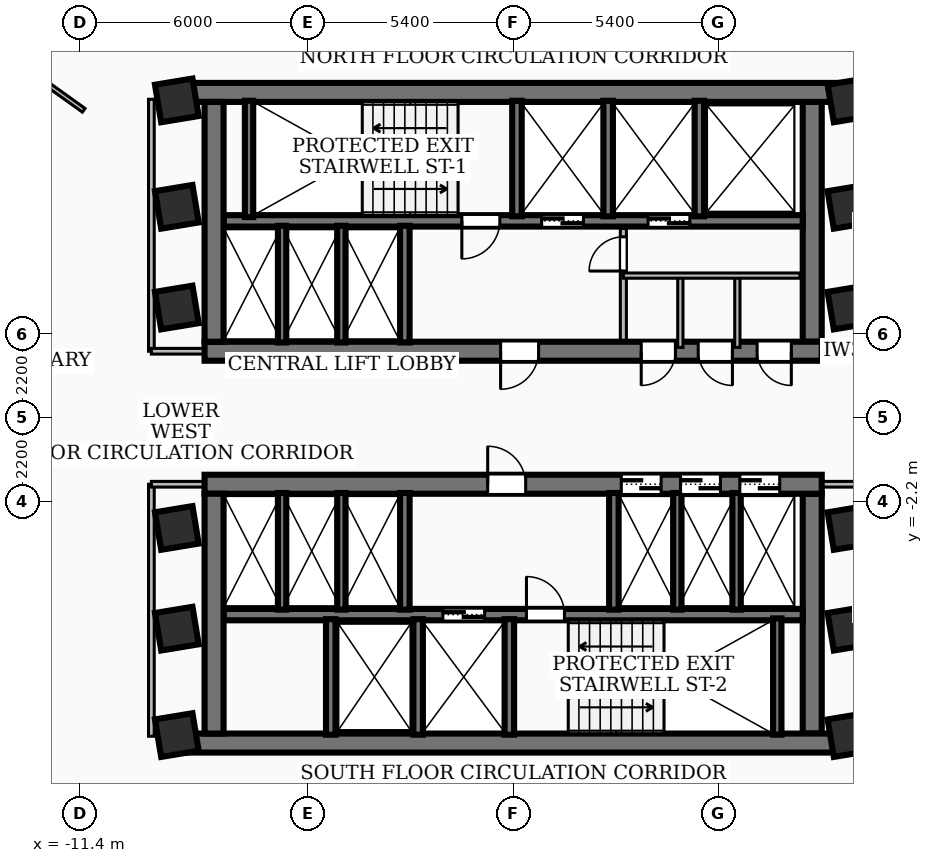
"""IFC4 building model, lengths in metres.
Left out: names, types, materials, properties, quantities, classifications, styles, units other than length and angle.
Written with IfcOpenShell. Run it as: python <this file> out.ifc"""

import sys

from ifc_helpers import new_model, si_unit, direction, frame, frame_2d, origin, origin_2d, place, context, subcontext, project, spatial, rectangle, extrude, element, fill, save


model = new_model("IFC4")
c1 = context("Model", 3, precision=1e-05, world=origin(), true_north=direction((0.0, 1.0)))
c2 = subcontext(c1, "Body", "Model", "MODEL_VIEW")
j1 = project(units=[si_unit("LENGTHUNIT", "METRE"), si_unit("PLANEANGLEUNIT", "RADIAN")], contexts=[c1])
p1 = place(None, origin())
s1 = spatial("IfcSite", under=j1, at=p1, CompositionType="ELEMENT")
p2 = place(p1, origin())
s2 = spatial("IfcBuilding", under=s1, at=p2, CompositionType="ELEMENT")
p3 = place(p2, frame((0.0, 0.0, 96.48)))
s3 = spatial("IfcBuildingStorey", under=s2, at=p3, CompositionType="ELEMENT", Elevation=96.48)
p4 = place(p3, frame((-8.78, 8.56, 0.0), z_axis=(0.0, 0.0, 1.0), x_axis=(1.0, 0.0, 0.0)))
e1 = element("IfcWall", 1, at=p4, inside=s3, PredefinedType="SHEAR", context=c2, shape_type="SweptSolid", body=[
    extrude(rectangle(XDim=17.56, YDim=0.5, at=frame_2d((8.78, 0.0))), origin(), (0.0, 0.0, 1.0), 3.34),
])
p5 = place(p3, frame((8.12, 1.75, 0.0), z_axis=(0.0, 0.0, 1.0), x_axis=(-1.0, 0.0, 0.0)))
e2 = element("IfcWall", 2, at=p5, inside=s3, PredefinedType="SHEAR", context=c2, shape_type="SweptSolid", body=[
    extrude(rectangle(XDim=16.24, YDim=0.5, at=frame_2d((8.12, 0.0))), origin(), (0.0, 0.0, 1.0), 3.34),
])
p6 = place(p5, frame((7.45, 0.0, 0.0)))
e3 = element("IfcOpeningElement", 3, at=p6, cuts=e2, PredefinedType="OPENING", context=c2, shape_type="SweptSolid", body=[
    extrude(rectangle(XDim=1.0, YDim=2.1, at=frame_2d((0.5, 1.05))), frame((0.0, 0.26, 0.0), z_axis=(0.0, -1.0, 0.0), x_axis=(1.0, 0.0, 0.0)), (0.0, 0.0, 1.0), 0.52),
])
p7 = place(p5, frame((3.85, 0.0, 0.0)))
e4 = element("IfcOpeningElement", 4, at=p7, cuts=e2, PredefinedType="OPENING", context=c2, shape_type="SweptSolid", body=[
    extrude(rectangle(XDim=0.9, YDim=2.06, at=frame_2d((0.45, 1.03))), frame((0.0, 0.26, 0.0), z_axis=(0.0, -1.0, 0.0), x_axis=(1.0, 0.0, 0.0)), (0.0, 0.0, 1.0), 0.52),
])
p8 = place(p5, frame((2.35, 0.0, 0.0)))
e5 = element("IfcOpeningElement", 5, at=p8, cuts=e2, PredefinedType="OPENING", context=c2, shape_type="SweptSolid", body=[
    extrude(rectangle(XDim=0.9, YDim=2.06, at=frame_2d((0.45, 1.03))), frame((0.0, 0.26, 0.0), z_axis=(0.0, -1.0, 0.0), x_axis=(1.0, 0.0, 0.0)), (0.0, 0.0, 1.0), 0.52),
])
p9 = place(p5, frame((0.8, 0.0, 0.0)))
e6 = element("IfcOpeningElement", 6, at=p9, cuts=e2, PredefinedType="OPENING", context=c2, shape_type="SweptSolid", body=[
    extrude(rectangle(XDim=0.9, YDim=2.06, at=frame_2d((0.45, 1.03))), frame((0.0, 0.26, 0.0), z_axis=(0.0, -1.0, 0.0), x_axis=(1.0, 0.0, 0.0)), (0.0, 0.0, 1.0), 0.52),
])
for number, where, z_axis, x_axis in (
    (7, (-7.87, 2.0, 0.0), (0.0, 0.0, 1.0), (0.0, 1.0, 0.0)),
    (8, (7.87, 8.31, 0.0), (0.0, 0.0, 1.0), (0.0, -1.0, 0.0)),
):
    element("IfcWall", number, at=place(p3, frame(where, z_axis=z_axis, x_axis=x_axis)), inside=s3, PredefinedType="SHEAR", context=c2, shape_type="SweptSolid", body=[
        extrude(rectangle(XDim=6.31, YDim=0.5, at=frame_2d((3.155, 0.0))), origin(), (0.0, 0.0, 1.0), 3.34),
    ])
p10 = place(p3, frame((7.62, 5.18, 0.0), z_axis=(0.0, 0.0, 1.0), x_axis=(-1.0, 0.0, 0.0)))
e9 = element("IfcWall", 9, at=p10, inside=s3, PredefinedType="SOLIDWALL", context=c2, shape_type="SweptSolid", body=[
    extrude(rectangle(XDim=15.24, YDim=0.3, at=frame_2d((7.62, 0.0))), origin(), (0.0, 0.0, 1.0), 3.34),
])
p11 = place(p10, frame((5.77, 0.0, 0.0)))
e10 = element("IfcOpeningElement", 10, at=p11, cuts=e9, PredefinedType="OPENING", context=c2, shape_type="SweptSolid", body=[
    extrude(rectangle(XDim=1.1, YDim=2.15, at=frame_2d((0.55, 1.075))), frame((0.0, 0.16, 0.0), z_axis=(0.0, -1.0, 0.0), x_axis=(1.0, 0.0, 0.0)), (0.0, 0.0, 1.0), 0.32),
])
p12 = place(p10, frame((2.97, 0.0, 0.0)))
e11 = element("IfcOpeningElement", 11, at=p12, cuts=e9, PredefinedType="OPENING", context=c2, shape_type="SweptSolid", body=[
    extrude(rectangle(XDim=1.1, YDim=2.15, at=frame_2d((0.55, 1.075))), frame((0.0, 0.16, 0.0), z_axis=(0.0, -1.0, 0.0), x_axis=(1.0, 0.0, 0.0)), (0.0, 0.0, 1.0), 0.32),
])
p13 = place(p10, frame((7.97, 0.0, 0.0)))
e12 = element("IfcOpeningElement", 12, at=p13, cuts=e9, PredefinedType="OPENING", context=c2, shape_type="SweptSolid", body=[
    extrude(rectangle(XDim=1.0, YDim=2.1, at=frame_2d((0.5, 1.05))), frame((0.0, 0.16, 0.0), z_axis=(0.0, -1.0, 0.0), x_axis=(1.0, 0.0, 0.0)), (0.0, 0.0, 1.0), 0.32),
])
p14 = place(p3, frame((8.78, -8.56, 0.0), z_axis=(0.0, 0.0, 1.0), x_axis=(-1.0, 0.0, 0.0)))
e13 = element("IfcWall", 13, at=p14, inside=s3, PredefinedType="SHEAR", context=c2, shape_type="SweptSolid", body=[
    extrude(rectangle(XDim=17.56, YDim=0.5, at=frame_2d((8.78, 0.0))), origin(), (0.0, 0.0, 1.0), 3.34),
])
p15 = place(p3, frame((-8.12, -1.75, 0.0), z_axis=(0.0, 0.0, 1.0), x_axis=(1.0, 0.0, 0.0)))
e14 = element("IfcWall", 14, at=p15, inside=s3, PredefinedType="SHEAR", context=c2, shape_type="SweptSolid", body=[
    extrude(rectangle(XDim=16.24, YDim=0.5, at=frame_2d((8.12, 0.0))), origin(), (0.0, 0.0, 1.0), 3.34),
])
p16 = place(p15, frame((7.45, 0.0, 0.0)))
e15 = element("IfcOpeningElement", 15, at=p16, cuts=e14, PredefinedType="OPENING", context=c2, shape_type="SweptSolid", body=[
    extrude(rectangle(XDim=1.0, YDim=2.1, at=frame_2d((0.5, 1.05))), frame((0.0, 0.26, 0.0), z_axis=(0.0, -1.0, 0.0), x_axis=(1.0, 0.0, 0.0)), (0.0, 0.0, 1.0), 0.52),
])
p17 = place(p15, frame((10.965, 0.0, 0.0)))
e16 = element("IfcOpeningElement", 16, at=p17, cuts=e14, PredefinedType="OPENING", context=c2, shape_type="SweptSolid", body=[
    extrude(rectangle(XDim=1.05, YDim=2.15, at=frame_2d((0.525, 1.075))), frame((0.0, 0.26, 0.0), z_axis=(0.0, -1.0, 0.0), x_axis=(1.0, 0.0, 0.0)), (0.0, 0.0, 1.0), 0.52),
])
p18 = place(p15, frame((12.525, 0.0, 0.0)))
e17 = element("IfcOpeningElement", 17, at=p18, cuts=e14, PredefinedType="OPENING", context=c2, shape_type="SweptSolid", body=[
    extrude(rectangle(XDim=1.05, YDim=2.15, at=frame_2d((0.525, 1.075))), frame((0.0, 0.26, 0.0), z_axis=(0.0, -1.0, 0.0), x_axis=(1.0, 0.0, 0.0)), (0.0, 0.0, 1.0), 0.52),
])
p19 = place(p15, frame((14.085, 0.0, 0.0)))
e18 = element("IfcOpeningElement", 18, at=p19, cuts=e14, PredefinedType="OPENING", context=c2, shape_type="SweptSolid", body=[
    extrude(rectangle(XDim=1.05, YDim=2.15, at=frame_2d((0.525, 1.075))), frame((0.0, 0.26, 0.0), z_axis=(0.0, -1.0, 0.0), x_axis=(1.0, 0.0, 0.0)), (0.0, 0.0, 1.0), 0.52),
])
for number, where, z_axis, x_axis in (
    (19, (-7.87, -8.31, 0.0), (0.0, 0.0, 1.0), (0.0, 1.0, 0.0)),
    (20, (7.87, -2.0, 0.0), (0.0, 0.0, 1.0), (0.0, -1.0, 0.0)),
):
    element("IfcWall", number, at=place(p3, frame(where, z_axis=z_axis, x_axis=x_axis)), inside=s3, PredefinedType="SHEAR", context=c2, shape_type="SweptSolid", body=[
        extrude(rectangle(XDim=6.31, YDim=0.5, at=frame_2d((3.155, 0.0))), origin(), (0.0, 0.0, 1.0), 3.34),
    ])
p20 = place(p3, frame((-7.62, -5.18, 0.0), z_axis=(0.0, 0.0, 1.0), x_axis=(1.0, 0.0, 0.0)))
e21 = element("IfcWall", 21, at=p20, inside=s3, PredefinedType="SOLIDWALL", context=c2, shape_type="SweptSolid", body=[
    extrude(rectangle(XDim=15.24, YDim=0.3, at=frame_2d((7.62, 0.0))), origin(), (0.0, 0.0, 1.0), 3.34),
])
p21 = place(p20, frame((5.77, 0.0, 0.0)))
e22 = element("IfcOpeningElement", 22, at=p21, cuts=e21, PredefinedType="OPENING", context=c2, shape_type="SweptSolid", body=[
    extrude(rectangle(XDim=1.1, YDim=2.15, at=frame_2d((0.55, 1.075))), frame((0.0, 0.16, 0.0), z_axis=(0.0, -1.0, 0.0), x_axis=(1.0, 0.0, 0.0)), (0.0, 0.0, 1.0), 0.32),
])
p22 = place(p20, frame((7.97, 0.0, 0.0)))
e23 = element("IfcOpeningElement", 23, at=p22, cuts=e21, PredefinedType="OPENING", context=c2, shape_type="SweptSolid", body=[
    extrude(rectangle(XDim=1.0, YDim=2.1, at=frame_2d((0.5, 1.05))), frame((0.0, 0.16, 0.0), z_axis=(0.0, -1.0, 0.0), x_axis=(1.0, 0.0, 0.0)), (0.0, 0.0, 1.0), 0.32),
])
for number, where, z_axis, x_axis in (
    (24, (-6.95, 5.28, 0.0), (0.0, 0.0, 1.0), (0.0, 1.0, 0.0)),
    (25, (6.95, -8.34, 0.0), (0.0, 0.0, 1.0), (0.0, 1.0, 0.0)),
):
    element("IfcWall", number, at=place(p3, frame(where, z_axis=z_axis, x_axis=x_axis)), inside=s3, PredefinedType="SOLIDWALL", context=c2, shape_type="SweptSolid", body=[
        extrude(rectangle(XDim=3.06, YDim=0.22, at=frame_2d((1.53, 0.0))), origin(), (0.0, 0.0, 1.0), 3.34),
    ])
for number, where, z_axis, x_axis in (
    (26, (0.1, 5.3, 0.0), (0.0, 0.0, 1.0), (0.0, 1.0, 0.0)),
    (27, (2.5, 5.3, 0.0), (0.0, 0.0, 1.0), (0.0, 1.0, 0.0)),
    (28, (4.9, 5.3, 0.0), (0.0, 0.0, 1.0), (0.0, 1.0, 0.0)),
):
    element("IfcWall", number, at=place(p3, frame(where, z_axis=z_axis, x_axis=x_axis)), inside=s3, PredefinedType="SOLIDWALL", context=c2, shape_type="SweptSolid", body=[
        extrude(rectangle(XDim=3.04, YDim=0.25, at=frame_2d((1.52, 0.0))), origin(), (0.0, 0.0, 1.0), 3.34),
    ])
p23 = place(p3, frame((-2.85, 1.98, 0.0), z_axis=(0.0, 0.0, 1.0), x_axis=(0.0, 1.0, 0.0)))
e29 = element("IfcWall", 29, at=p23, inside=s3, PredefinedType="SOLIDWALL", context=c2, shape_type="SweptSolid", body=[
    extrude(rectangle(XDim=3.07, YDim=0.25, at=frame_2d((1.535, 0.0))), origin(), (0.0, 0.0, 1.0), 3.34),
])
for number, where, z_axis, x_axis in (
    (30, (-0.1, -8.34, 0.0), (0.0, 0.0, 1.0), (0.0, 1.0, 0.0)),
    (31, (-2.5, -8.34, 0.0), (0.0, 0.0, 1.0), (0.0, 1.0, 0.0)),
    (32, (-4.8, -8.34, 0.0), (0.0, 0.0, 1.0), (0.0, 1.0, 0.0)),
):
    element("IfcWall", number, at=place(p3, frame(where, z_axis=z_axis, x_axis=x_axis)), inside=s3, PredefinedType="SOLIDWALL", context=c2, shape_type="SweptSolid", body=[
        extrude(rectangle(XDim=3.04, YDim=0.25, at=frame_2d((1.52, 0.0))), origin(), (0.0, 0.0, 1.0), 3.34),
    ])
for number, where, z_axis, x_axis in (
    (33, (-2.85, -5.05, 0.0), (0.0, 0.0, 1.0), (0.0, 1.0, 0.0)),
    (34, (2.65, -5.05, 0.0), (0.0, 0.0, 1.0), (0.0, 1.0, 0.0)),
):
    element("IfcWall", number, at=place(p3, frame(where, z_axis=z_axis, x_axis=x_axis)), inside=s3, PredefinedType="SOLIDWALL", context=c2, shape_type="SweptSolid", body=[
        extrude(rectangle(XDim=3.07, YDim=0.25, at=frame_2d((1.535, 0.0))), origin(), (0.0, 0.0, 1.0), 3.34),
    ])
for number, where, z_axis, x_axis in (
    (35, (-6.08, 1.98, 0.0), (0.0, 0.0, 1.0), (0.0, 1.0, 0.0)),
    (36, (-4.52, 1.98, 0.0), (0.0, 0.0, 1.0), (0.0, 1.0, 0.0)),
    (37, (4.32, -5.05, 0.0), (0.0, 0.0, 1.0), (0.0, 1.0, 0.0)),
    (38, (5.88, -5.05, 0.0), (0.0, 0.0, 1.0), (0.0, 1.0, 0.0)),
    (39, (-6.08, -5.05, 0.0), (0.0, 0.0, 1.0), (0.0, 1.0, 0.0)),
    (40, (-4.52, -5.05, 0.0), (0.0, 0.0, 1.0), (0.0, 1.0, 0.0)),
):
    element("IfcWall", number, at=place(p3, frame(where, z_axis=z_axis, x_axis=x_axis)), inside=s3, PredefinedType="SOLIDWALL", context=c2, shape_type="SweptSolid", body=[
        extrude(rectangle(XDim=3.07, YDim=0.22, at=frame_2d((1.535, 0.0))), origin(), (0.0, 0.0, 1.0), 3.34),
    ])
for number, where, z_axis, x_axis in (
    (41, (-8.85, -5.55, 0.0), (0.0, 0.0, 1.0), (0.987, 0.163, 0.0)),
    (42, (-8.85, -2.9, 0.0), (0.0, 0.0, 1.0), (0.987, 0.163, 0.0)),
    (43, (-8.85, 2.9, 0.0), (0.0, 0.0, 1.0), (0.987, 0.163, 0.0)),
    (44, (-8.85, 5.55, 0.0), (0.0, 0.0, 1.0), (0.987, 0.163, 0.0)),
    (45, (8.85, -5.55, 0.0), (0.0, 0.0, 1.0), (0.987, 0.163, 0.0)),
    (46, (8.85, -2.9, 0.0), (0.0, 0.0, 1.0), (0.987, 0.163, 0.0)),
    (47, (8.85, 2.9, 0.0), (0.0, 0.0, 1.0), (0.987, 0.163, 0.0)),
    (48, (8.85, 5.55, 0.0), (0.0, 0.0, 1.0), (0.987, 0.163, 0.0)),
    (49, (-8.85, 8.35, 0.0), (0.0, 0.0, 1.0), (0.987, 0.163, 0.0)),
    (50, (8.85, -8.35, 0.0), (0.0, 0.0, 1.0), (0.987, 0.163, 0.0)),
    (51, (8.85, 8.35, 0.0), (0.0, 0.0, 1.0), (0.987, 0.163, 0.0)),
    (52, (-8.85, -8.35, 0.0), (0.0, 0.0, 1.0), (0.987, 0.163, 0.0)),
):
    element("IfcColumn", number, at=place(p3, frame(where, z_axis=z_axis, x_axis=x_axis)), inside=s3, PredefinedType="COLUMN", context=c2, shape_type="SweptSolid", body=[
        extrude(rectangle(XDim=1.0, YDim=1.0, at=origin_2d()), origin(), (0.0, 0.0, 1.0), 3.6),
    ])
p24 = place(p3, frame((-12.12, -15.142, 0.0), z_axis=(0.0, 0.0, 1.0), x_axis=(-0.163241835244, 0.986586085056, 0.0)))
e53 = element("IfcWall", 53, at=p24, inside=s3, PredefinedType="SOLIDWALL", context=c2, shape_type="SweptSolid", body=[
    extrude(rectangle(XDim=6.775, YDim=0.24, at=frame_2d((3.387, 0.0))), origin(), (0.0, 0.0, 1.0), 3.34),
])
p25 = place(p3, frame((2.9, 2.04, 0.0), z_axis=(0.0, 0.0, 1.0), x_axis=(0.0, 1.0, 0.0)))
e54 = element("IfcWall", 54, at=p25, inside=s3, PredefinedType="PARTITIONING", context=c2, shape_type="SweptSolid", body=[
    extrude(rectangle(XDim=2.94, YDim=0.16, at=frame_2d((1.47, 0.0))), origin(), (0.0, 0.0, 1.0), 2.405),
])
p26 = place(p25, frame((1.82, 0.0, 0.0)))
e55 = element("IfcOpeningElement", 55, at=p26, cuts=e54, PredefinedType="OPENING", context=c2, shape_type="SweptSolid", body=[
    extrude(rectangle(XDim=0.9, YDim=2.06, at=frame_2d((0.45, 1.03))), frame((0.0, 0.09, 0.0), z_axis=(0.0, -1.0, 0.0), x_axis=(1.0, 0.0, 0.0)), (0.0, 0.0, 1.0), 0.18),
])
p27 = place(p3, frame((2.9, 3.74, 0.0), z_axis=(0.0, 0.0, 1.0), x_axis=(1.0, 0.0, 0.0)))
e56 = element("IfcWall", 56, at=p27, inside=s3, PredefinedType="PARTITIONING", context=c2, shape_type="SweptSolid", body=[
    extrude(rectangle(XDim=4.65, YDim=0.138, at=frame_2d((2.325, 0.0))), origin(), (0.0, 0.0, 1.0), 3.34),
])
for number, where, z_axis, x_axis in (
    (57, (4.4, 1.85, 0.0), (0.0, 0.0, 1.0), (0.0, 1.0, 0.0)),
    (58, (5.9, 1.85, 0.0), (0.0, 0.0, 1.0), (0.0, 1.0, 0.0)),
):
    element("IfcWall", number, at=place(p3, frame(where, z_axis=z_axis, x_axis=x_axis)), inside=s3, PredefinedType="PARTITIONING", context=c2, shape_type="SweptSolid", body=[
        extrude(rectangle(XDim=1.89, YDim=0.138, at=frame_2d((0.945, 0.0))), origin(), (0.0, 0.0, 1.0), 2.405),
    ])
p28 = place(p3, frame((-9.52, 1.75, 0.0), z_axis=(0.0, 0.0, 1.0), x_axis=(0.0, 1.0, 0.0)))
e59 = element("IfcWall", 59, at=p28, inside=s3, PredefinedType="PARTITIONING", context=c2, shape_type="SweptSolid", body=[
    extrude(rectangle(XDim=6.63, YDim=0.15, at=frame_2d((3.315, 0.0))), origin(), (0.0, 0.0, 1.0), 2.486),
])
p29 = place(p3, frame((-7.85, 1.75, 0.0), z_axis=(0.0, 0.0, 1.0), x_axis=(-1.0, 0.0, 0.0)))
e60 = element("IfcWall", 60, at=p29, inside=s3, PredefinedType="PARTITIONING", context=c2, shape_type="SweptSolid", body=[
    extrude(rectangle(XDim=1.67, YDim=0.15, at=frame_2d((0.835, 0.0))), origin(), (0.0, 0.0, 1.0), 2.405),
])
p30 = place(p3, frame((-9.52, -8.38, 0.0), z_axis=(0.0, 0.0, 1.0), x_axis=(0.0, 1.0, 0.0)))
e61 = element("IfcWall", 61, at=p30, inside=s3, PredefinedType="PARTITIONING", context=c2, shape_type="SweptSolid", body=[
    extrude(rectangle(XDim=6.63, YDim=0.15, at=frame_2d((3.315, 0.0))), origin(), (0.0, 0.0, 1.0), 2.486),
])
for number, where, z_axis, x_axis in (
    (62, (-7.85, -1.75, 0.0), (0.0, 0.0, 1.0), (-1.0, 0.0, 0.0)),
    (63, (7.85, 1.75, 0.0), (0.0, 0.0, 1.0), (1.0, 0.0, 0.0)),
    (64, (7.85, -1.75, 0.0), (0.0, 0.0, 1.0), (1.0, 0.0, 0.0)),
):
    element("IfcWall", number, at=place(p3, frame(where, z_axis=z_axis, x_axis=x_axis)), inside=s3, PredefinedType="PARTITIONING", context=c2, shape_type="SweptSolid", body=[
        extrude(rectangle(XDim=1.67, YDim=0.15, at=frame_2d((0.835, 0.0))), origin(), (0.0, 0.0, 1.0), 2.405),
    ])
p31 = place(p3, frame((-11.3, 8.09, 0.0), z_axis=(0.0, 0.0, 1.0), x_axis=(-0.813131268368, 0.582080355623, 0.0)))
e65 = element("IfcWall", 65, at=p31, inside=s3, PredefinedType="PARTITIONING", context=c2, shape_type="SweptSolid", body=[
    extrude(rectangle(XDim=5.757, YDim=0.12, at=frame_2d((2.878, 0.0))), origin(), (0.0, 0.0, 1.0), 3.34),
])
p32 = place(p6, origin())
e66 = element("IfcDoor", 66, at=p32, inside=s3, OperationType="SINGLE_SWING_RIGHT", PredefinedType="DOOR", context=c2, shape_type="SweptSolid", body=[
    extrude(rectangle(XDim=1.0, YDim=2.1, at=frame_2d((0.5, 1.05))), frame((0.0, 0.025, 0.0), z_axis=(0.0, -1.0, 0.0), x_axis=(1.0, 0.0, 0.0)), (0.0, 0.0, 1.0), 0.05),
])
fill(e3, e66)
p33 = place(p16, origin())
e67 = element("IfcDoor", 67, at=p33, inside=s3, OperationType="SINGLE_SWING_LEFT", PredefinedType="DOOR", context=c2, shape_type="SweptSolid", body=[
    extrude(rectangle(XDim=1.0, YDim=2.1, at=frame_2d((0.5, 1.05))), frame((0.0, 0.025, 0.0), z_axis=(0.0, -1.0, 0.0), x_axis=(1.0, 0.0, 0.0)), (0.0, 0.0, 1.0), 0.05),
])
fill(e15, e67)
p34 = place(p11, origin())
e68 = element("IfcDoor", 68, at=p34, inside=s3, OperationType="DOUBLE_DOOR_SLIDING", PredefinedType="DOOR", context=c2, shape_type="SweptSolid", body=[
    extrude(rectangle(XDim=1.1, YDim=2.15, at=frame_2d((0.55, 1.075))), frame((0.0, 0.025, 0.0), z_axis=(0.0, -1.0, 0.0), x_axis=(1.0, 0.0, 0.0)), (0.0, 0.0, 1.0), 0.05),
])
fill(e10, e68)
p35 = place(p12, origin())
e69 = element("IfcDoor", 69, at=p35, inside=s3, OperationType="DOUBLE_DOOR_SLIDING", PredefinedType="DOOR", context=c2, shape_type="SweptSolid", body=[
    extrude(rectangle(XDim=1.1, YDim=2.15, at=frame_2d((0.55, 1.075))), frame((0.0, 0.025, 0.0), z_axis=(0.0, -1.0, 0.0), x_axis=(1.0, 0.0, 0.0)), (0.0, 0.0, 1.0), 0.05),
])
fill(e11, e69)
p36 = place(p13, origin())
e70 = element("IfcDoor", 70, at=p36, inside=s3, OperationType="SINGLE_SWING_RIGHT", PredefinedType="DOOR", context=c2, shape_type="SweptSolid", body=[
    extrude(rectangle(XDim=1.0, YDim=2.1, at=frame_2d((0.5, 1.05))), frame((0.0, 0.025, 0.0), z_axis=(0.0, -1.0, 0.0), x_axis=(1.0, 0.0, 0.0)), (0.0, 0.0, 1.0), 0.05),
])
fill(e12, e70)
p37 = place(p21, origin())
e71 = element("IfcDoor", 71, at=p37, inside=s3, OperationType="DOUBLE_DOOR_SLIDING", PredefinedType="DOOR", context=c2, shape_type="SweptSolid", body=[
    extrude(rectangle(XDim=1.1, YDim=2.15, at=frame_2d((0.55, 1.075))), frame((0.0, 0.025, 0.0), z_axis=(0.0, -1.0, 0.0), x_axis=(1.0, 0.0, 0.0)), (0.0, 0.0, 1.0), 0.05),
])
fill(e22, e71)
p38 = place(p22, origin())
e72 = element("IfcDoor", 72, at=p38, inside=s3, OperationType="SINGLE_SWING_LEFT", PredefinedType="DOOR", context=c2, shape_type="SweptSolid", body=[
    extrude(rectangle(XDim=1.0, YDim=2.1, at=frame_2d((0.5, 1.05))), frame((0.0, 0.025, 0.0), z_axis=(0.0, -1.0, 0.0), x_axis=(1.0, 0.0, 0.0)), (0.0, 0.0, 1.0), 0.05),
])
fill(e23, e72)
p39 = place(p17, origin())
e73 = element("IfcDoor", 73, at=p39, inside=s3, OperationType="DOUBLE_DOOR_SLIDING", PredefinedType="DOOR", context=c2, shape_type="SweptSolid", body=[
    extrude(rectangle(XDim=1.05, YDim=2.15, at=frame_2d((0.525, 1.075))), frame((0.0, 0.025, 0.0), z_axis=(0.0, -1.0, 0.0), x_axis=(1.0, 0.0, 0.0)), (0.0, 0.0, 1.0), 0.05),
])
fill(e16, e73)
p40 = place(p18, origin())
e74 = element("IfcDoor", 74, at=p40, inside=s3, OperationType="DOUBLE_DOOR_SLIDING", PredefinedType="DOOR", context=c2, shape_type="SweptSolid", body=[
    extrude(rectangle(XDim=1.05, YDim=2.15, at=frame_2d((0.525, 1.075))), frame((0.0, 0.025, 0.0), z_axis=(0.0, -1.0, 0.0), x_axis=(1.0, 0.0, 0.0)), (0.0, 0.0, 1.0), 0.05),
])
fill(e17, e74)
p41 = place(p19, origin())
e75 = element("IfcDoor", 75, at=p41, inside=s3, OperationType="DOUBLE_DOOR_SLIDING", PredefinedType="DOOR", context=c2, shape_type="SweptSolid", body=[
    extrude(rectangle(XDim=1.05, YDim=2.15, at=frame_2d((0.525, 1.075))), frame((0.0, 0.025, 0.0), z_axis=(0.0, -1.0, 0.0), x_axis=(1.0, 0.0, 0.0)), (0.0, 0.0, 1.0), 0.05),
])
fill(e18, e75)
p42 = place(p7, origin())
e76 = element("IfcDoor", 76, at=p42, inside=s3, OperationType="SINGLE_SWING_RIGHT", PredefinedType="DOOR", context=c2, shape_type="SweptSolid", body=[
    extrude(rectangle(XDim=0.9, YDim=2.06, at=frame_2d((0.45, 1.03))), frame((0.0, 0.025, 0.0), z_axis=(0.0, -1.0, 0.0), x_axis=(1.0, 0.0, 0.0)), (0.0, 0.0, 1.0), 0.05),
])
fill(e4, e76)
p43 = place(p8, origin())
e77 = element("IfcDoor", 77, at=p43, inside=s3, OperationType="SINGLE_SWING_LEFT", PredefinedType="DOOR", context=c2, shape_type="SweptSolid", body=[
    extrude(rectangle(XDim=0.9, YDim=2.06, at=frame_2d((0.45, 1.03))), frame((0.0, 0.025, 0.0), z_axis=(0.0, -1.0, 0.0), x_axis=(1.0, 0.0, 0.0)), (0.0, 0.0, 1.0), 0.05),
])
fill(e5, e77)
p44 = place(p9, origin())
e78 = element("IfcDoor", 78, at=p44, inside=s3, OperationType="SINGLE_SWING_LEFT", PredefinedType="DOOR", context=c2, shape_type="SweptSolid", body=[
    extrude(rectangle(XDim=0.9, YDim=2.06, at=frame_2d((0.45, 1.03))), frame((0.0, 0.025, 0.0), z_axis=(0.0, -1.0, 0.0), x_axis=(1.0, 0.0, 0.0)), (0.0, 0.0, 1.0), 0.05),
])
fill(e6, e78)
p45 = place(p26, origin())
e79 = element("IfcDoor", 79, at=p45, inside=s3, OperationType="SINGLE_SWING_LEFT", PredefinedType="DOOR", context=c2, shape_type="SweptSolid", body=[
    extrude(rectangle(XDim=0.9, YDim=2.06, at=frame_2d((0.45, 1.03))), frame((0.0, 0.025, 0.0), z_axis=(0.0, -1.0, 0.0), x_axis=(1.0, 0.0, 0.0)), (0.0, 0.0, 1.0), 0.05),
])
fill(e55, e79)
save(model, sys.argv[1])
